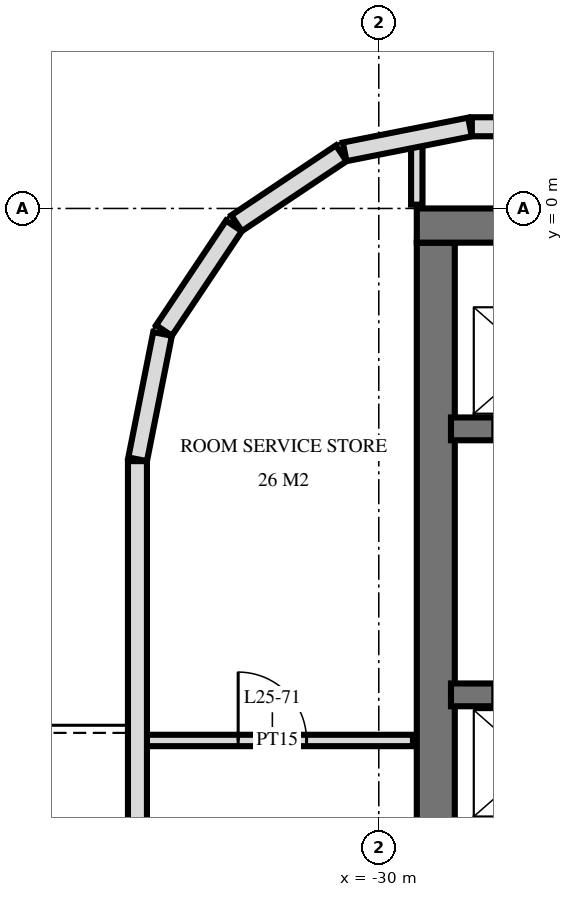
"""IFC4 building model, lengths in metres.
Left out: names, types, materials, properties, quantities, classifications, styles, units other than length and angle.
Written with IfcOpenShell. Run it as: python <this file> out.ifc"""

import sys

from ifc_helpers import new_model, si_unit, direction, frame, frame_2d, origin, place, context, subcontext, project, spatial, rectangle, extrude, element, fill, save


model = new_model("IFC4")
c1 = context("Model", 3, precision=1e-05, world=origin(), true_north=direction((0.0, 1.0)))
c2 = subcontext(c1, "Body", "Model", "MODEL_VIEW")
j1 = project(units=[si_unit("LENGTHUNIT", "METRE"), si_unit("PLANEANGLEUNIT", "RADIAN")], contexts=[c1])
p1 = place(None, origin())
s1 = spatial("IfcSite", under=j1, at=p1, CompositionType="ELEMENT")
p2 = place(p1, origin())
s2 = spatial("IfcBuilding", under=s1, at=p2, CompositionType="ELEMENT")
p3 = place(p2, frame((0.0, 0.0, 99.6)))
s3 = spatial("IfcBuildingStorey", under=s2, at=p3, CompositionType="ELEMENT", Elevation=99.6)
p4 = place(p3, frame((-29.5, -0.225, 0.0), z_axis=(0.0, 0.0, 1.0), x_axis=(1.0, 0.0, 0.0)))
e1 = element("IfcWall", 1, at=p4, inside=s3, PredefinedType="SHEAR", context=c2, shape_type="SweptSolid", body=[
    extrude(rectangle(XDim=19.5, YDim=0.45, at=frame_2d((9.75, 0.0))), origin(), (0.0, 0.0, 1.0), 3.6),
])
p5 = place(p3, frame((-29.25, -14.55, 0.0), z_axis=(0.0, 0.0, 1.0), x_axis=(0.0, 1.0, 0.0)))
e2 = element("IfcWall", 2, at=p5, inside=s3, PredefinedType="SHEAR", context=c2, shape_type="SweptSolid", body=[
    extrude(rectangle(XDim=14.1, YDim=0.5, at=frame_2d((7.05, 0.0))), origin(), (0.0, 0.0, 1.0), 3.6),
])
p6 = place(p3, frame((-29.05, -2.9, 0.0), z_axis=(0.0, 0.0, 1.0), x_axis=(1.0, 0.0, 0.0)))
e3 = element("IfcWall", 3, at=p6, inside=s3, PredefinedType="SHEAR", context=c2, shape_type="SweptSolid", body=[
    extrude(rectangle(XDim=18.7, YDim=0.3, at=frame_2d((9.35, 0.0))), origin(), (0.0, 0.0, 1.0), 3.6),
])
p7 = place(p6, frame((2.95, 0.0, 0.0)))
e4 = element("IfcOpeningElement", 4, at=p7, cuts=e3, PredefinedType="OPENING", context=c2, shape_type="SweptSolid", body=[
    extrude(rectangle(XDim=1.1, YDim=2.1, at=frame_2d((0.55, 1.05))), frame((0.0, 0.16, 0.0), z_axis=(0.0, -1.0, 0.0), x_axis=(1.0, 0.0, 0.0)), (0.0, 0.0, 1.0), 0.32),
])
p8 = place(p6, frame((0.55, 0.0, 0.0)))
e5 = element("IfcOpeningElement", 5, at=p8, cuts=e3, PredefinedType="OPENING", context=c2, shape_type="SweptSolid", body=[
    extrude(rectangle(XDim=1.1, YDim=2.1, at=frame_2d((0.55, 1.05))), frame((0.0, 0.16, 0.0), z_axis=(0.0, -1.0, 0.0), x_axis=(1.0, 0.0, 0.0)), (0.0, 0.0, 1.0), 0.32),
])
p9 = place(p6, frame((10.9, 0.0, 0.0)))
e6 = element("IfcOpeningElement", 6, at=p9, cuts=e3, PredefinedType="OPENING", context=c2, shape_type="SweptSolid", body=[
    extrude(rectangle(XDim=0.9, YDim=2.1, at=frame_2d((0.45, 1.05))), frame((0.0, 0.16, 0.0), z_axis=(0.0, -1.0, 0.0), x_axis=(1.0, 0.0, 0.0)), (0.0, 0.0, 1.0), 0.32),
])
p10 = place(p6, frame((16.85, 0.0, 0.0)))
e7 = element("IfcOpeningElement", 7, at=p10, cuts=e3, PredefinedType="OPENING", context=c2, shape_type="SweptSolid", body=[
    extrude(rectangle(XDim=1.0, YDim=2.1, at=frame_2d((0.5, 1.05))), frame((0.0, 0.16, 0.0), z_axis=(0.0, -1.0, 0.0), x_axis=(1.0, 0.0, 0.0)), (0.0, 0.0, 1.0), 0.32),
])
p11 = place(p6, frame((13.85, 0.0, 0.0)))
e8 = element("IfcOpeningElement", 8, at=p11, cuts=e3, PredefinedType="OPENING", context=c2, shape_type="SweptSolid", body=[
    extrude(rectangle(XDim=1.0, YDim=2.1, at=frame_2d((0.5, 1.05))), frame((0.0, 0.16, 0.0), z_axis=(0.0, -1.0, 0.0), x_axis=(1.0, 0.0, 0.0)), (0.0, 0.0, 1.0), 0.32),
])
p12 = place(p6, frame((5.6, 0.0, 0.0)))
e9 = element("IfcOpeningElement", 9, at=p12, cuts=e3, PredefinedType="OPENING", context=c2, shape_type="SweptSolid", body=[
    extrude(rectangle(XDim=1.0, YDim=2.1, at=frame_2d((0.5, 1.05))), frame((0.0, 0.16, 0.0), z_axis=(0.0, -1.0, 0.0), x_axis=(1.0, 0.0, 0.0)), (0.0, 0.0, 1.0), 0.32),
])
p13 = place(p3, frame((-29.05, -6.4, 0.0), z_axis=(0.0, 0.0, 1.0), x_axis=(1.0, 0.0, 0.0)))
e10 = element("IfcWall", 10, at=p13, inside=s3, PredefinedType="SHEAR", context=c2, shape_type="SweptSolid", body=[
    extrude(rectangle(XDim=18.7, YDim=0.3, at=frame_2d((9.35, 0.0))), origin(), (0.0, 0.0, 1.0), 3.6),
])
p14 = place(p13, frame((2.95, 0.0, 0.0)))
e11 = element("IfcOpeningElement", 11, at=p14, cuts=e10, PredefinedType="OPENING", context=c2, shape_type="SweptSolid", body=[
    extrude(rectangle(XDim=1.1, YDim=2.1, at=frame_2d((0.55, 1.05))), frame((0.0, 0.16, 0.0), z_axis=(0.0, -1.0, 0.0), x_axis=(1.0, 0.0, 0.0)), (0.0, 0.0, 1.0), 0.32),
])
p15 = place(p13, frame((0.55, 0.0, 0.0)))
e12 = element("IfcOpeningElement", 12, at=p15, cuts=e10, PredefinedType="OPENING", context=c2, shape_type="SweptSolid", body=[
    extrude(rectangle(XDim=1.1, YDim=2.1, at=frame_2d((0.55, 1.05))), frame((0.0, 0.16, 0.0), z_axis=(0.0, -1.0, 0.0), x_axis=(1.0, 0.0, 0.0)), (0.0, 0.0, 1.0), 0.32),
])
p16 = place(p13, frame((10.8, 0.0, 0.0)))
e13 = element("IfcOpeningElement", 13, at=p16, cuts=e10, PredefinedType="OPENING", context=c2, shape_type="SweptSolid", body=[
    extrude(rectangle(XDim=1.1, YDim=2.1, at=frame_2d((0.55, 1.05))), frame((0.0, 0.16, 0.0), z_axis=(0.0, -1.0, 0.0), x_axis=(1.0, 0.0, 0.0)), (0.0, 0.0, 1.0), 0.32),
])
p17 = place(p13, frame((5.6, 0.0, 0.0)))
e14 = element("IfcOpeningElement", 14, at=p17, cuts=e10, PredefinedType="OPENING", context=c2, shape_type="SweptSolid", body=[
    extrude(rectangle(XDim=1.0, YDim=2.1, at=frame_2d((0.5, 1.05))), frame((0.0, 0.16, 0.0), z_axis=(0.0, -1.0, 0.0), x_axis=(1.0, 0.0, 0.0)), (0.0, 0.0, 1.0), 0.32),
])
p18 = place(p3, frame((28.775, 1.075, 0.0), z_axis=(0.0, 0.0, 1.0), x_axis=(-1.0, 0.0, 0.0)))
e15 = element("IfcWall", 15, at=p18, inside=s3, PredefinedType="SOLIDWALL", context=c2, shape_type="SweptSolid", body=[
    extrude(rectangle(XDim=57.551, YDim=0.25, at=frame_2d((28.775, 0.0))), origin(), (0.0, 0.0, 1.0), 3.32),
])
p19 = place(p18, frame((21.275, 0.0, 0.3)))
e16 = element("IfcOpeningElement", 16, at=p19, cuts=e15, PredefinedType="OPENING", context=c2, shape_type="SweptSolid", body=[
    extrude(rectangle(XDim=2.4, YDim=2.1, at=frame_2d((1.2, 1.05))), frame((0.0, 0.135, 0.0), z_axis=(0.0, -1.0, 0.0), x_axis=(1.0, 0.0, 0.0)), (0.0, 0.0, 1.0), 0.27),
])
p20 = place(p3, frame((-28.8, 1.073, 0.0), z_axis=(0.0, 0.0, 1.0), x_axis=(-0.980803419081, -0.194999110559, 0.0)))
e17 = element("IfcWall", 17, at=p20, inside=s3, PredefinedType="SOLIDWALL", context=c2, shape_type="SweptSolid", body=[
    extrude(rectangle(XDim=1.681, YDim=0.25, at=frame_2d((0.841, 0.0))), origin(), (0.0, 0.0, 1.0), 3.32),
])
for number, where, z_axis, x_axis in (
    (18, (-30.494, 0.726, 0.0), (0.0, 0.0, 1.0), (-0.831, -0.556, 0.0)),
    (19, (-31.906, -0.229, 0.0), (0.0, 0.0, 1.0), (-0.556, -0.831, 0.0)),
):
    element("IfcWall", number, at=place(p3, frame(where, z_axis=z_axis, x_axis=x_axis)), inside=s3, PredefinedType="SOLIDWALL", context=c2, shape_type="SweptSolid", body=[
        extrude(rectangle(XDim=1.656, YDim=0.25, at=frame_2d((0.828, 0.0))), origin(), (0.0, 0.0, 1.0), 3.32),
    ])
p21 = place(p3, frame((-32.844, -1.651, 0.0), z_axis=(0.0, 0.0, 1.0), x_axis=(-0.19513878023, -0.980775640221, 0.0)))
e20 = element("IfcWall", 20, at=p21, inside=s3, PredefinedType="SOLIDWALL", context=c2, shape_type="SweptSolid", body=[
    extrude(rectangle(XDim=1.681, YDim=0.25, at=frame_2d((0.841, 0.0))), origin(), (0.0, 0.0, 1.0), 3.32),
])
p22 = place(p3, frame((-33.175, -3.325, 0.0), z_axis=(0.0, 0.0, 1.0), x_axis=(0.0, -1.0, 0.0)))
e21 = element("IfcWall", 21, at=p22, inside=s3, PredefinedType="SOLIDWALL", context=c2, shape_type="SweptSolid", body=[
    extrude(rectangle(XDim=21.551, YDim=0.25, at=frame_2d((10.775, 0.0))), origin(), (0.0, 0.0, 1.0), 3.32),
])
p23 = place(p22, frame((6.575, 0.0, 0.0)))
e22 = element("IfcOpeningElement", 22, at=p23, cuts=e21, PredefinedType="OPENING", context=c2, shape_type="SweptSolid", body=[
    extrude(rectangle(XDim=1.8, YDim=2.4, at=frame_2d((0.9, 1.2))), frame((0.0, 0.135, 0.0), z_axis=(0.0, -1.0, 0.0), x_axis=(1.0, 0.0, 0.0)), (0.0, 0.0, 1.0), 0.27),
])
p24 = place(p22, frame((9.425, 0.0, 0.3)))
e23 = element("IfcOpeningElement", 23, at=p24, cuts=e21, PredefinedType="OPENING", context=c2, shape_type="SweptSolid", body=[
    extrude(rectangle(XDim=1.8, YDim=2.1, at=frame_2d((0.9, 1.05))), frame((0.0, 0.135, 0.0), z_axis=(0.0, -1.0, 0.0), x_axis=(1.0, 0.0, 0.0)), (0.0, 0.0, 1.0), 0.27),
])
p25 = place(p22, frame((12.575, 0.0, 0.3)))
e24 = element("IfcOpeningElement", 24, at=p25, cuts=e21, PredefinedType="OPENING", context=c2, shape_type="SweptSolid", body=[
    extrude(rectangle(XDim=1.2, YDim=2.1, at=frame_2d((0.6, 1.05))), frame((0.0, 0.135, 0.0), z_axis=(0.0, -1.0, 0.0), x_axis=(1.0, 0.0, 0.0)), (0.0, 0.0, 1.0), 0.27),
])
p26 = place(p22, frame((15.575, 0.0, 0.0)))
e25 = element("IfcOpeningElement", 25, at=p26, cuts=e21, PredefinedType="OPENING", context=c2, shape_type="SweptSolid", body=[
    extrude(rectangle(XDim=1.8, YDim=2.4, at=frame_2d((0.9, 1.2))), frame((0.0, 0.135, 0.0), z_axis=(0.0, -1.0, 0.0), x_axis=(1.0, 0.0, 0.0)), (0.0, 0.0, 1.0), 0.27),
])
p27 = place(p22, frame((18.875, 0.0, 0.0)))
e26 = element("IfcOpeningElement", 26, at=p27, cuts=e21, PredefinedType="OPENING", context=c2, shape_type="SweptSolid", body=[
    extrude(rectangle(XDim=1.8, YDim=2.4, at=frame_2d((0.9, 1.2))), frame((0.0, 0.135, 0.0), z_axis=(0.0, -1.0, 0.0), x_axis=(1.0, 0.0, 0.0)), (0.0, 0.0, 1.0), 0.27),
])
p28 = place(p3, frame((-29.5, 0.05, 0.0), z_axis=(0.0, 0.0, 1.0), x_axis=(0.0, 1.0, 0.0)))
e27 = element("IfcWall", 27, at=p28, inside=s3, PredefinedType="PARTITIONING", context=c2, shape_type="SweptSolid", body=[
    extrude(rectangle(XDim=0.827, YDim=0.15, at=frame_2d((0.414, 0.0))), origin(), (0.0, 0.0, 1.0), 3.32),
])
p29 = place(p3, frame((-33.12, -7.0, 0.0), z_axis=(0.0, 0.0, 1.0), x_axis=(1.0, 0.0, 0.0)))
e28 = element("IfcWall", 28, at=p29, inside=s3, PredefinedType="PARTITIONING", context=c2, shape_type="SweptSolid", body=[
    extrude(rectangle(XDim=3.57, YDim=0.15, at=frame_2d((1.785, 0.0))), origin(), (0.0, 0.0, 1.0), 3.32),
])
p30 = place(p29, frame((1.27, 0.0, 0.0)))
e29 = element("IfcOpeningElement", 29, at=p30, cuts=e28, PredefinedType="OPENING", context=c2, shape_type="SweptSolid", body=[
    extrude(rectangle(XDim=0.9, YDim=2.1, at=frame_2d((0.45, 1.05))), frame((0.0, 0.085, 0.0), z_axis=(0.0, -1.0, 0.0), x_axis=(1.0, 0.0, 0.0)), (0.0, 0.0, 1.0), 0.17),
])
p31 = place(p30, origin())
e30 = element("IfcDoor", 30, at=p31, inside=s3, OperationType="SINGLE_SWING_RIGHT", PredefinedType="DOOR", context=c2, shape_type="SweptSolid", body=[
    extrude(rectangle(XDim=0.9, YDim=2.1, at=frame_2d((0.45, 1.05))), frame((0.0, 0.025, 0.0), z_axis=(0.0, -1.0, 0.0), x_axis=(1.0, 0.0, 0.0)), (0.0, 0.0, 1.0), 0.05),
])
fill(e29, e30)
save(model, sys.argv[1])
